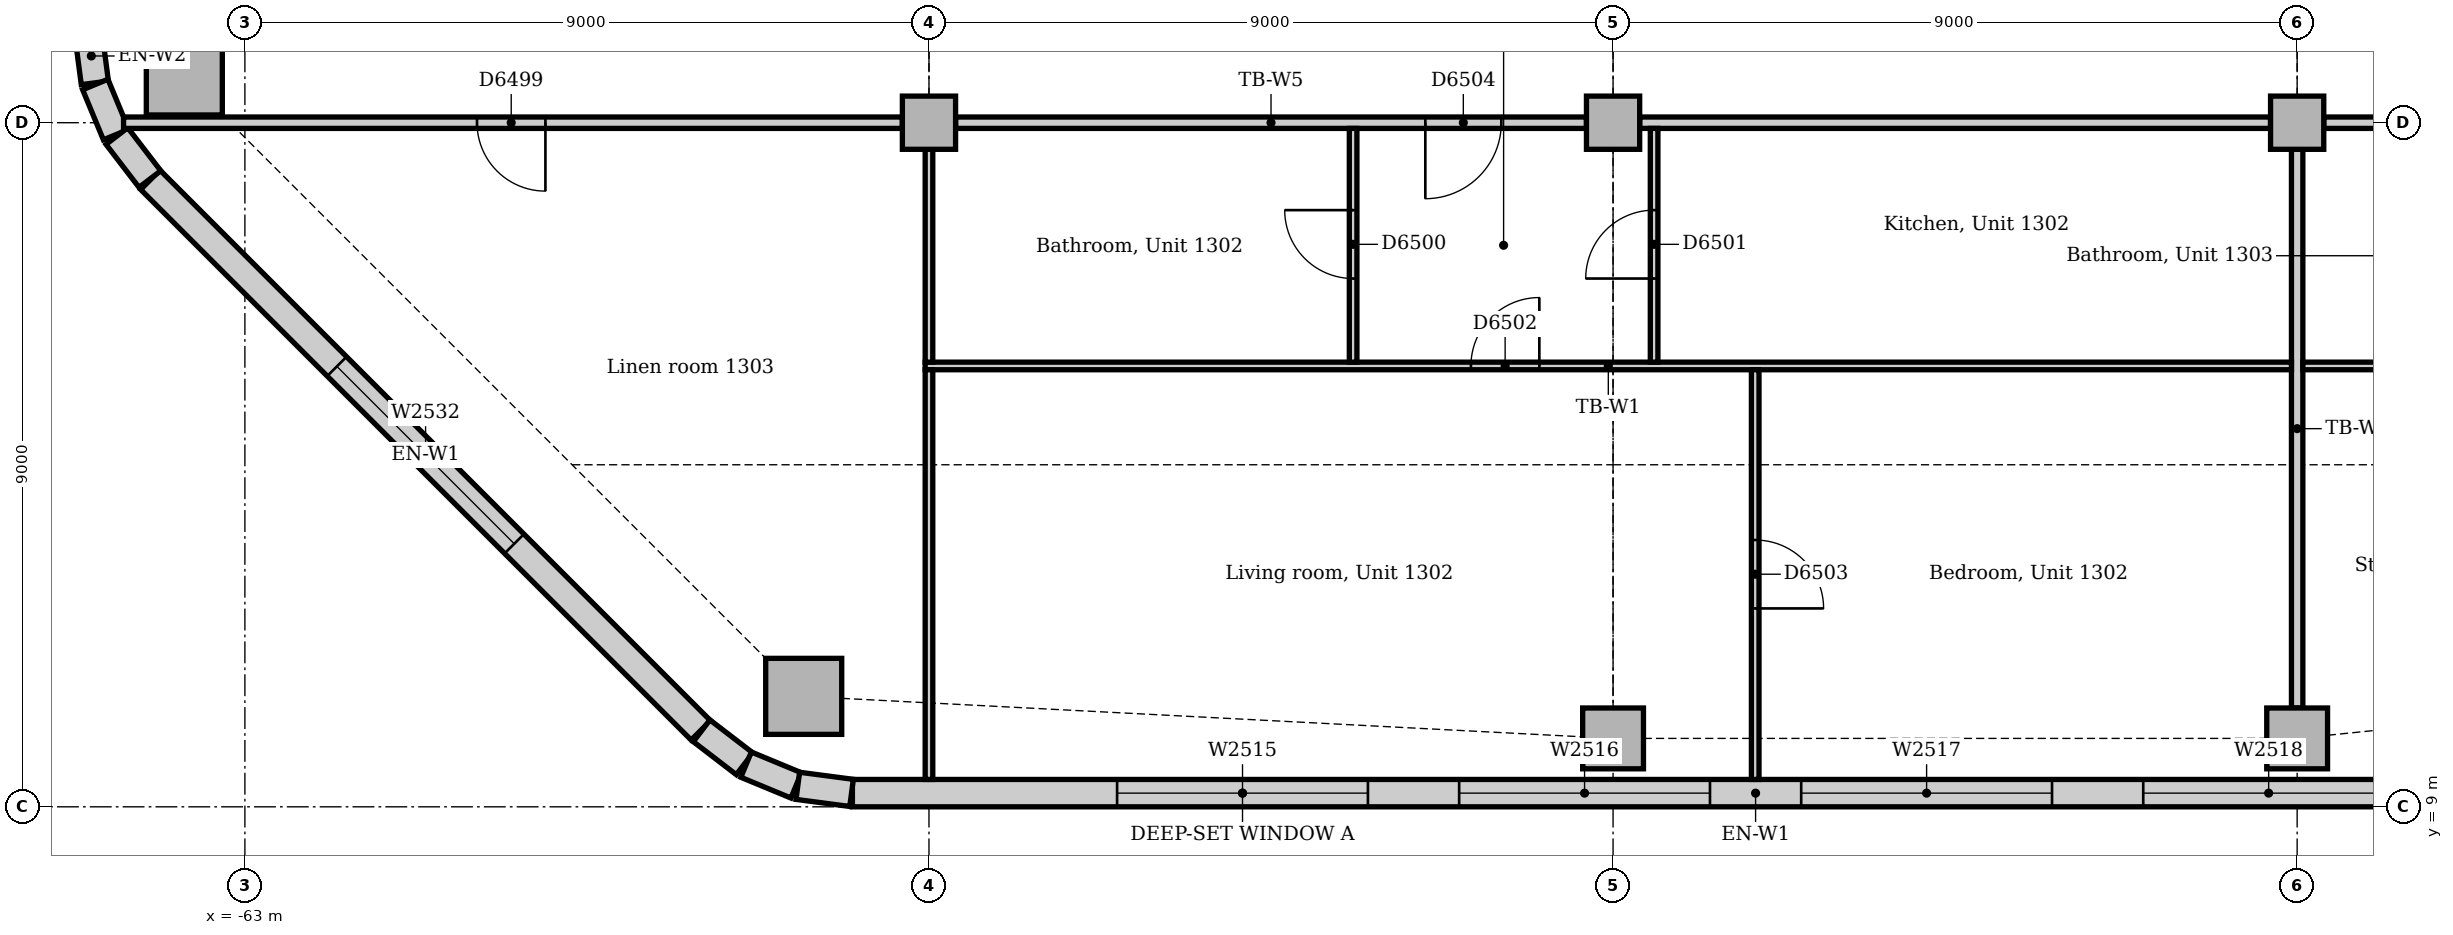
"""IFC4 building model, lengths in metres.
Left out: names, types, materials, properties, quantities, classifications, styles, units other than length and angle.
Written with IfcOpenShell. Run it as: python <this file> out.ifc"""

import sys

from ifc_helpers import new_model, si_unit, direction, frame, frame_2d, origin, origin_2d, place, context, subcontext, project, spatial, rectangle, extrude, element, fill, save


model = new_model("IFC4")
c1 = context("Model", 3, precision=1e-05, world=origin(), true_north=direction((0.0, 1.0)))
c2 = subcontext(c1, "Body", "Model", "MODEL_VIEW")
j1 = project(units=[si_unit("LENGTHUNIT", "METRE"), si_unit("PLANEANGLEUNIT", "RADIAN")], contexts=[c1])
p1 = place(None, origin())
s1 = spatial("IfcSite", under=j1, at=p1, CompositionType="ELEMENT")
p2 = place(p1, origin())
s2 = spatial("IfcBuilding", under=s1, at=p2, CompositionType="ELEMENT")
p3 = place(p2, frame((0.0, 0.0, 59.0)))
s3 = spatial("IfcBuildingStorey", under=s2, at=p3, CompositionType="ELEMENT", Elevation=59.0)
for number, where, z_axis, x_axis in (
    (1, (-55.648, 10.453, 0.0), (0.0, 0.0, 1.0), (1.0, 0.0, 0.0)),
    (2, (-63.797, 18.602, 0.0), (0.0, 0.0, 1.0), (1.0, 0.0, 0.0)),
):
    element("IfcColumn", number, at=place(p3, frame(where, z_axis=z_axis, x_axis=x_axis)), inside=s3, PredefinedType="COLUMN", context=c2, shape_type="SweptSolid", body=[
        extrude(rectangle(XDim=1.0, YDim=1.0, at=origin_2d()), origin(), (0.0, 0.0, 1.0), 3.85),
    ])
for number, where, z_axis, x_axis in (
    (3, (-45.0, 9.9, 0.0), (0.0, 0.0, 1.0), (1.0, 0.0, 0.0)),
    (4, (-36.0, 9.9, 0.0), (0.0, 0.0, 1.0), (1.0, 0.0, 0.0)),
):
    element("IfcColumn", number, at=place(p3, frame(where, z_axis=z_axis, x_axis=x_axis)), inside=s3, PredefinedType="COLUMN", context=c2, shape_type="SweptSolid", body=[
        extrude(rectangle(XDim=0.8, YDim=0.8, at=origin_2d()), origin(), (0.0, 0.0, 1.0), 3.85),
    ])
for number, where, z_axis, x_axis in (
    (5, (-54.0, 18.0, 0.0), (0.0, 0.0, 1.0), (1.0, 0.0, 0.0)),
    (6, (-45.0, 18.0, 0.0), (0.0, 0.0, 1.0), (1.0, 0.0, 0.0)),
    (7, (-36.0, 18.0, 0.0), (0.0, 0.0, 1.0), (1.0, 0.0, 0.0)),
):
    element("IfcColumn", number, at=place(p3, frame(where, z_axis=z_axis, x_axis=x_axis)), inside=s3, PredefinedType="COLUMN", context=c2, shape_type="SweptSolid", body=[
        extrude(rectangle(XDim=0.7, YDim=0.7, at=origin_2d()), origin(), (0.0, 0.0, 1.0), 3.85),
    ])
p4 = place(p3, frame((-55.007, 9.18, 0.0), z_axis=(0.0, 0.0, 1.0), x_axis=(1.0, 0.0, 0.0)))
e8 = element("IfcWall", 8, at=p4, inside=s3, PredefinedType="STANDARD", context=c2, shape_type="SweptSolid", body=[
    extrude(rectangle(XDim=23.765, YDim=0.36, at=frame_2d((11.882, 0.0))), origin(), (0.0, 0.0, 1.0), 3.85),
])
p5 = place(p4, frame((3.482, 0.0, 0.9)))
e9 = element("IfcOpeningElement", 9, at=p5, cuts=e8, PredefinedType="OPENING", context=c2, shape_type="SweptSolid", body=[
    extrude(rectangle(XDim=3.3, YDim=1.6, at=frame_2d((1.65, 0.8))), frame((0.0, 0.19, 0.0), z_axis=(0.0, -1.0, 0.0), x_axis=(1.0, 0.0, 0.0)), (0.0, 0.0, 1.0), 0.38),
])
p6 = place(p4, frame((7.982, 0.0, 0.9)))
e10 = element("IfcOpeningElement", 10, at=p6, cuts=e8, PredefinedType="OPENING", context=c2, shape_type="SweptSolid", body=[
    extrude(rectangle(XDim=3.3, YDim=1.6, at=frame_2d((1.65, 0.8))), frame((0.0, 0.19, 0.0), z_axis=(0.0, -1.0, 0.0), x_axis=(1.0, 0.0, 0.0)), (0.0, 0.0, 1.0), 0.38),
])
p7 = place(p4, frame((12.482, 0.0, 0.9)))
e11 = element("IfcOpeningElement", 11, at=p7, cuts=e8, PredefinedType="OPENING", context=c2, shape_type="SweptSolid", body=[
    extrude(rectangle(XDim=3.3, YDim=1.6, at=frame_2d((1.65, 0.8))), frame((0.0, 0.19, 0.0), z_axis=(0.0, -1.0, 0.0), x_axis=(1.0, 0.0, 0.0)), (0.0, 0.0, 1.0), 0.38),
])
p8 = place(p4, frame((16.982, 0.0, 0.9)))
e12 = element("IfcOpeningElement", 12, at=p8, cuts=e8, PredefinedType="OPENING", context=c2, shape_type="SweptSolid", body=[
    extrude(rectangle(XDim=3.3, YDim=1.6, at=frame_2d((1.65, 0.8))), frame((0.0, 0.19, 0.0), z_axis=(0.0, -1.0, 0.0), x_axis=(1.0, 0.0, 0.0)), (0.0, 0.0, 1.0), 0.38),
])
p9 = place(p4, frame((21.424, 0.0, 0.9)))
e13 = element("IfcOpeningElement", 13, at=p9, cuts=e8, PredefinedType="OPENING", context=c2, shape_type="SweptSolid", body=[
    extrude(rectangle(XDim=1.8, YDim=1.6, at=frame_2d((0.9, 0.8))), frame((0.0, 0.19, 0.0), z_axis=(0.0, -1.0, 0.0), x_axis=(1.0, 0.0, 0.0)), (0.0, 0.0, 1.0), 0.38),
])
p10 = place(p3, frame((-64.244, 17.249, 0.0), z_axis=(0.0, 0.0, 1.0), x_axis=(0.707106781187, -0.707106781187, 0.0)))
e14 = element("IfcWall", 14, at=p10, inside=s3, PredefinedType="STANDARD", context=c2, shape_type="SweptSolid", body=[
    extrude(rectangle(XDim=10.243, YDim=0.36, at=frame_2d((5.121, 0.0))), origin(), (0.0, 0.0, 1.0), 3.85),
])
p11 = place(p10, frame((3.471, 0.0, 0.9)))
e15 = element("IfcOpeningElement", 15, at=p11, cuts=e14, PredefinedType="OPENING", context=c2, shape_type="SweptSolid", body=[
    extrude(rectangle(XDim=3.3, YDim=1.6, at=frame_2d((1.65, 0.8))), frame((0.0, 0.19, 0.0), z_axis=(0.0, -1.0, 0.0), x_axis=(1.0, 0.0, 0.0)), (0.0, 0.0, 1.0), 0.38),
])
for number, where, z_axis, x_axis in (
    (16, (-65.067, 19.231, 0.0), (0.0, 0.0, 1.0), (0.131, -0.991, 0.0)),
    (17, (-64.968, 18.503, 0.0), (0.0, 0.0, 1.0), (0.383, -0.924, 0.0)),
):
    element("IfcWall", number, at=place(p3, frame(where, z_axis=z_axis, x_axis=x_axis)), inside=s3, PredefinedType="STANDARD", context=c2, shape_type="SweptSolid", body=[
        extrude(rectangle(XDim=0.713, YDim=0.36, at=frame_2d((0.356, 0.0))), origin(), (0.0, 0.0, 1.0), 3.85),
    ])
for number, where, z_axis, x_axis in (
    (18, (-64.684, 17.825, 0.0), (0.0, 0.0, 1.0), (0.609, -0.793, 0.0)),
    (19, (-56.991, 10.0, 0.0), (0.0, 0.0, 1.0), (0.793, -0.609, 0.0)),
):
    element("IfcWall", number, at=place(p3, frame(where, z_axis=z_axis, x_axis=x_axis)), inside=s3, PredefinedType="STANDARD", context=c2, shape_type="SweptSolid", body=[
        extrude(rectangle(XDim=0.713, YDim=0.36, at=frame_2d((0.357, 0.0))), origin(), (0.0, 0.0, 1.0), 3.85),
    ])
for number, where, z_axis, x_axis in (
    (20, (-56.406, 9.555, 0.0), (0.0, 0.0, 1.0), (0.924, -0.383, 0.0)),
    (21, (-55.726, 9.276, 0.0), (0.0, 0.0, 1.0), (0.991, -0.131, 0.0)),
):
    element("IfcWall", number, at=place(p3, frame(where, z_axis=z_axis, x_axis=x_axis)), inside=s3, PredefinedType="STANDARD", context=c2, shape_type="SweptSolid", body=[
        extrude(rectangle(XDim=0.713, YDim=0.36, at=frame_2d((0.356, 0.0))), origin(), (0.0, 0.0, 1.0), 3.85),
    ])
p12 = place(p3, frame((-35.65, 18.0, 0.0), z_axis=(0.0, 0.0, 1.0), x_axis=(1.0, 0.0, 0.0)))
e22 = element("IfcWall", 22, at=p12, inside=s3, PredefinedType="PARTITIONING", context=c2, shape_type="SweptSolid", body=[
    extrude(rectangle(XDim=7.35, YDim=0.15, at=frame_2d((3.675, 0.0))), origin(), (0.0, 0.0, 1.0), 3.158),
])
p13 = place(p12, frame((2.778, 0.0, 0.0)))
e23 = element("IfcOpeningElement", 23, at=p13, cuts=e22, PredefinedType="OPENING", context=c2, shape_type="SweptSolid", body=[
    extrude(rectangle(XDim=1.0, YDim=2.1, at=frame_2d((0.5, 1.05))), frame((0.0, 0.085, 0.0), z_axis=(0.0, -1.0, 0.0), x_axis=(1.0, 0.0, 0.0)), (0.0, 0.0, 1.0), 0.17),
])
p14 = place(p3, frame((-44.65, 18.0, 0.0), z_axis=(0.0, 0.0, 1.0), x_axis=(1.0, 0.0, 0.0)))
e24 = element("IfcWall", 24, at=p14, inside=s3, PredefinedType="PARTITIONING", context=c2, shape_type="SweptSolid", body=[
    extrude(rectangle(XDim=8.3, YDim=0.15, at=frame_2d((4.15, 0.0))), origin(), (0.0, 0.0, 1.0), 3.158),
])
p15 = place(p3, frame((-53.65, 18.0, 0.0), z_axis=(0.0, 0.0, 1.0), x_axis=(1.0, 0.0, 0.0)))
e25 = element("IfcWall", 25, at=p15, inside=s3, PredefinedType="PARTITIONING", context=c2, shape_type="SweptSolid", body=[
    extrude(rectangle(XDim=8.3, YDim=0.15, at=frame_2d((4.15, 0.0))), origin(), (0.0, 0.0, 1.0), 3.158),
])
p16 = place(p15, frame((6.18, 0.0, 0.0)))
e26 = element("IfcOpeningElement", 26, at=p16, cuts=e25, PredefinedType="OPENING", context=c2, shape_type="SweptSolid", body=[
    extrude(rectangle(XDim=1.0, YDim=2.1, at=frame_2d((0.5, 1.05))), frame((0.0, 0.085, 0.0), z_axis=(0.0, -1.0, 0.0), x_axis=(1.0, 0.0, 0.0)), (0.0, 0.0, 1.0), 0.17),
])
p17 = place(p3, frame((-64.596, 18.0, 0.0), z_axis=(0.0, 0.0, 1.0), x_axis=(1.0, 0.0, 0.0)))
e27 = element("IfcWall", 27, at=p17, inside=s3, PredefinedType="PARTITIONING", context=c2, shape_type="SweptSolid", body=[
    extrude(rectangle(XDim=10.246, YDim=0.15, at=frame_2d((5.123, 0.0))), origin(), (0.0, 0.0, 1.0), 3.158),
])
p18 = place(p17, frame((4.65, 0.0, 0.0)))
e28 = element("IfcOpeningElement", 28, at=p18, cuts=e27, PredefinedType="OPENING", context=c2, shape_type="SweptSolid", body=[
    extrude(rectangle(XDim=0.9, YDim=2.1, at=frame_2d((0.45, 1.05))), frame((0.0, 0.085, 0.0), z_axis=(0.0, -1.0, 0.0), x_axis=(1.0, 0.0, 0.0)), (0.0, 0.0, 1.0), 0.17),
])
p19 = place(p3, frame((-36.0, 10.3, 0.0), z_axis=(0.0, 0.0, 1.0), x_axis=(0.0, 1.0, 0.0)))
e29 = element("IfcWall", 29, at=p19, inside=s3, PredefinedType="PARTITIONING", context=c2, shape_type="SweptSolid", body=[
    extrude(rectangle(XDim=7.35, YDim=0.15, at=frame_2d((3.675, 0.0))), origin(), (0.0, 0.0, 1.0), 3.256),
])
p20 = place(p3, frame((-54.05, 14.8, 0.0), z_axis=(0.0, 0.0, 1.0), x_axis=(1.0, 0.0, 0.0)))
e30 = element("IfcWall", 30, at=p20, inside=s3, PredefinedType="PARTITIONING", context=c2, shape_type="SweptSolid", body=[
    extrude(rectangle(XDim=17.975, YDim=0.1, at=frame_2d((8.988, 0.0))), origin(), (0.0, 0.0, 1.0), 3.85),
])
p21 = place(p20, frame((7.18, 0.0, 0.0)))
e31 = element("IfcOpeningElement", 31, at=p21, cuts=e30, PredefinedType="OPENING", context=c2, shape_type="SweptSolid", body=[
    extrude(rectangle(XDim=0.9, YDim=2.1, at=frame_2d((0.45, 1.05))), frame((0.0, 0.06, 0.0), z_axis=(0.0, -1.0, 0.0), x_axis=(1.0, 0.0, 0.0)), (0.0, 0.0, 1.0), 0.12),
])
p22 = place(p3, frame((-35.925, 14.8, 0.0), z_axis=(0.0, 0.0, 1.0), x_axis=(1.0, 0.0, 0.0)))
e32 = element("IfcWall", 32, at=p22, inside=s3, PredefinedType="PARTITIONING", context=c2, shape_type="SweptSolid", body=[
    extrude(rectangle(XDim=8.565, YDim=0.1, at=frame_2d((4.282, 0.0))), origin(), (0.0, 0.0, 1.0), 3.85),
])
p23 = place(p22, frame((3.103, 0.0, 0.0)))
e33 = element("IfcOpeningElement", 33, at=p23, cuts=e32, PredefinedType="OPENING", context=c2, shape_type="SweptSolid", body=[
    extrude(rectangle(XDim=0.9, YDim=2.1, at=frame_2d((0.45, 1.05))), frame((0.0, 0.06, 0.0), z_axis=(0.0, -1.0, 0.0), x_axis=(1.0, 0.0, 0.0)), (0.0, 0.0, 1.0), 0.12),
])
p24 = place(p3, frame((-54.0, 9.36, 0.0), z_axis=(0.0, 0.0, 1.0), x_axis=(0.0, 1.0, 0.0)))
e34 = element("IfcWall", 34, at=p24, inside=s3, PredefinedType="PARTITIONING", context=c2, shape_type="SweptSolid", body=[
    extrude(rectangle(XDim=5.39, YDim=0.1, at=frame_2d((2.695, 0.0))), origin(), (0.0, 0.0, 1.0), 3.256),
])
p25 = place(p3, frame((-54.0, 14.85, 0.0), z_axis=(0.0, 0.0, 1.0), x_axis=(0.0, 1.0, 0.0)))
e35 = element("IfcWall", 35, at=p25, inside=s3, PredefinedType="PARTITIONING", context=c2, shape_type="SweptSolid", body=[
    extrude(rectangle(XDim=2.8, YDim=0.1, at=frame_2d((1.4, 0.0))), origin(), (0.0, 0.0, 1.0), 3.256),
])
p26 = place(p3, frame((-43.13, 9.36, 0.0), z_axis=(0.0, 0.0, 1.0), x_axis=(0.0, 1.0, 0.0)))
e36 = element("IfcWall", 36, at=p26, inside=s3, PredefinedType="PARTITIONING", context=c2, shape_type="SweptSolid", body=[
    extrude(rectangle(XDim=5.39, YDim=0.1, at=frame_2d((2.695, 0.0))), origin(), (0.0, 0.0, 1.0), 3.85),
])
p27 = place(p26, frame((2.25, 0.0, 0.0)))
e37 = element("IfcOpeningElement", 37, at=p27, cuts=e36, PredefinedType="OPENING", context=c2, shape_type="SweptSolid", body=[
    extrude(rectangle(XDim=0.9, YDim=2.1, at=frame_2d((0.45, 1.05))), frame((0.0, 0.06, 0.0), z_axis=(0.0, -1.0, 0.0), x_axis=(1.0, 0.0, 0.0)), (0.0, 0.0, 1.0), 0.12),
])
p28 = place(p3, frame((-48.42, 14.85, 0.0), z_axis=(0.0, 0.0, 1.0), x_axis=(0.0, 1.0, 0.0)))
e38 = element("IfcWall", 38, at=p28, inside=s3, PredefinedType="PARTITIONING", context=c2, shape_type="SweptSolid", body=[
    extrude(rectangle(XDim=3.075, YDim=0.1, at=frame_2d((1.538, 0.0))), origin(), (0.0, 0.0, 1.0), 3.85),
])
p29 = place(p28, frame((1.1, 0.0, 0.0)))
e39 = element("IfcOpeningElement", 39, at=p29, cuts=e38, PredefinedType="OPENING", context=c2, shape_type="SweptSolid", body=[
    extrude(rectangle(XDim=0.9, YDim=2.1, at=frame_2d((0.45, 1.05))), frame((0.0, 0.06, 0.0), z_axis=(0.0, -1.0, 0.0), x_axis=(1.0, 0.0, 0.0)), (0.0, 0.0, 1.0), 0.12),
])
p30 = place(p3, frame((-44.46, 14.85, 0.0), z_axis=(0.0, 0.0, 1.0), x_axis=(0.0, 1.0, 0.0)))
e40 = element("IfcWall", 40, at=p30, inside=s3, PredefinedType="PARTITIONING", context=c2, shape_type="SweptSolid", body=[
    extrude(rectangle(XDim=3.075, YDim=0.1, at=frame_2d((1.538, 0.0))), origin(), (0.0, 0.0, 1.0), 3.85),
])
p31 = place(p30, frame((1.1, 0.0, 0.0)))
e41 = element("IfcOpeningElement", 41, at=p31, cuts=e40, PredefinedType="OPENING", context=c2, shape_type="SweptSolid", body=[
    extrude(rectangle(XDim=0.9, YDim=2.1, at=frame_2d((0.45, 1.05))), frame((0.0, 0.06, 0.0), z_axis=(0.0, -1.0, 0.0), x_axis=(1.0, 0.0, 0.0)), (0.0, 0.0, 1.0), 0.12),
])
p32 = place(p5, origin())
e42 = element("IfcWindow", 42, at=p32, inside=s3, PartitioningType="SINGLE_PANEL", PredefinedType="WINDOW", context=c2, shape_type="SweptSolid", body=[
    extrude(rectangle(XDim=3.3, YDim=1.6, at=frame_2d((1.65, 0.8))), frame((0.0, 0.13, 0.0), z_axis=(0.0, -1.0, 0.0), x_axis=(1.0, 0.0, 0.0)), (0.0, 0.0, 1.0), 0.06),
])
fill(e9, e42)
p33 = place(p6, origin())
e43 = element("IfcWindow", 43, at=p33, inside=s3, PartitioningType="SINGLE_PANEL", PredefinedType="WINDOW", context=c2, shape_type="SweptSolid", body=[
    extrude(rectangle(XDim=3.3, YDim=1.6, at=frame_2d((1.65, 0.8))), frame((0.0, 0.13, 0.0), z_axis=(0.0, -1.0, 0.0), x_axis=(1.0, 0.0, 0.0)), (0.0, 0.0, 1.0), 0.06),
])
fill(e10, e43)
p34 = place(p7, origin())
e44 = element("IfcWindow", 44, at=p34, inside=s3, PartitioningType="SINGLE_PANEL", PredefinedType="WINDOW", context=c2, shape_type="SweptSolid", body=[
    extrude(rectangle(XDim=3.3, YDim=1.6, at=frame_2d((1.65, 0.8))), frame((0.0, 0.13, 0.0), z_axis=(0.0, -1.0, 0.0), x_axis=(1.0, 0.0, 0.0)), (0.0, 0.0, 1.0), 0.06),
])
fill(e11, e44)
p35 = place(p8, origin())
e45 = element("IfcWindow", 45, at=p35, inside=s3, PartitioningType="SINGLE_PANEL", PredefinedType="WINDOW", context=c2, shape_type="SweptSolid", body=[
    extrude(rectangle(XDim=3.3, YDim=1.6, at=frame_2d((1.65, 0.8))), frame((0.0, 0.13, 0.0), z_axis=(0.0, -1.0, 0.0), x_axis=(1.0, 0.0, 0.0)), (0.0, 0.0, 1.0), 0.06),
])
fill(e12, e45)
p36 = place(p11, origin())
e46 = element("IfcWindow", 46, at=p36, inside=s3, PartitioningType="SINGLE_PANEL", PredefinedType="WINDOW", context=c2, shape_type="SweptSolid", body=[
    extrude(rectangle(XDim=3.3, YDim=1.6, at=frame_2d((1.65, 0.8))), frame((0.0, 0.13, 0.0), z_axis=(0.0, -1.0, 0.0), x_axis=(1.0, 0.0, 0.0)), (0.0, 0.0, 1.0), 0.06),
])
fill(e15, e46)
p37 = place(p18, frame((0.9, 0.0, 0.0), z_axis=(0.0, 0.0, 1.0), x_axis=(-1.0, 0.0, 0.0)))
e47 = element("IfcDoor", 47, at=p37, inside=s3, OperationType="SINGLE_SWING_LEFT", PredefinedType="DOOR", context=c2, shape_type="SweptSolid", body=[
    extrude(rectangle(XDim=0.9, YDim=2.1, at=frame_2d((0.45, 1.05))), frame((0.0, 0.025, 0.0), z_axis=(0.0, -1.0, 0.0), x_axis=(1.0, 0.0, 0.0)), (0.0, 0.0, 1.0), 0.05),
])
fill(e28, e47)
p38 = place(p29, origin())
e48 = element("IfcDoor", 48, at=p38, inside=s3, OperationType="SINGLE_SWING_RIGHT", PredefinedType="DOOR", context=c2, shape_type="SweptSolid", body=[
    extrude(rectangle(XDim=0.9, YDim=2.1, at=frame_2d((0.45, 1.05))), frame((0.0, 0.025, 0.0), z_axis=(0.0, -1.0, 0.0), x_axis=(1.0, 0.0, 0.0)), (0.0, 0.0, 1.0), 0.05),
])
fill(e39, e48)
p39 = place(p31, origin())
e49 = element("IfcDoor", 49, at=p39, inside=s3, OperationType="SINGLE_SWING_LEFT", PredefinedType="DOOR", context=c2, shape_type="SweptSolid", body=[
    extrude(rectangle(XDim=0.9, YDim=2.1, at=frame_2d((0.45, 1.05))), frame((0.0, 0.025, 0.0), z_axis=(0.0, -1.0, 0.0), x_axis=(1.0, 0.0, 0.0)), (0.0, 0.0, 1.0), 0.05),
])
fill(e41, e49)
p40 = place(p21, origin())
e50 = element("IfcDoor", 50, at=p40, inside=s3, OperationType="SINGLE_SWING_RIGHT", PredefinedType="DOOR", context=c2, shape_type="SweptSolid", body=[
    extrude(rectangle(XDim=0.9, YDim=2.1, at=frame_2d((0.45, 1.05))), frame((0.0, 0.025, 0.0), z_axis=(0.0, -1.0, 0.0), x_axis=(1.0, 0.0, 0.0)), (0.0, 0.0, 1.0), 0.05),
])
fill(e31, e50)
p41 = place(p27, frame((0.9, 0.0, 0.0), z_axis=(0.0, 0.0, 1.0), x_axis=(-1.0, 0.0, 0.0)))
e51 = element("IfcDoor", 51, at=p41, inside=s3, OperationType="SINGLE_SWING_RIGHT", PredefinedType="DOOR", context=c2, shape_type="SweptSolid", body=[
    extrude(rectangle(XDim=0.9, YDim=2.1, at=frame_2d((0.45, 1.05))), frame((0.0, 0.025, 0.0), z_axis=(0.0, -1.0, 0.0), x_axis=(1.0, 0.0, 0.0)), (0.0, 0.0, 1.0), 0.05),
])
fill(e37, e51)
p42 = place(p16, frame((1.0, 0.0, 0.0), z_axis=(0.0, 0.0, 1.0), x_axis=(-1.0, 0.0, 0.0)))
e52 = element("IfcDoor", 52, at=p42, inside=s3, OperationType="SINGLE_SWING_RIGHT", PredefinedType="DOOR", context=c2, shape_type="SweptSolid", body=[
    extrude(rectangle(XDim=1.0, YDim=2.1, at=frame_2d((0.5, 1.05))), frame((0.0, 0.025, 0.0), z_axis=(0.0, -1.0, 0.0), x_axis=(1.0, 0.0, 0.0)), (0.0, 0.0, 1.0), 0.05),
])
fill(e26, e52)
save(model, sys.argv[1])
